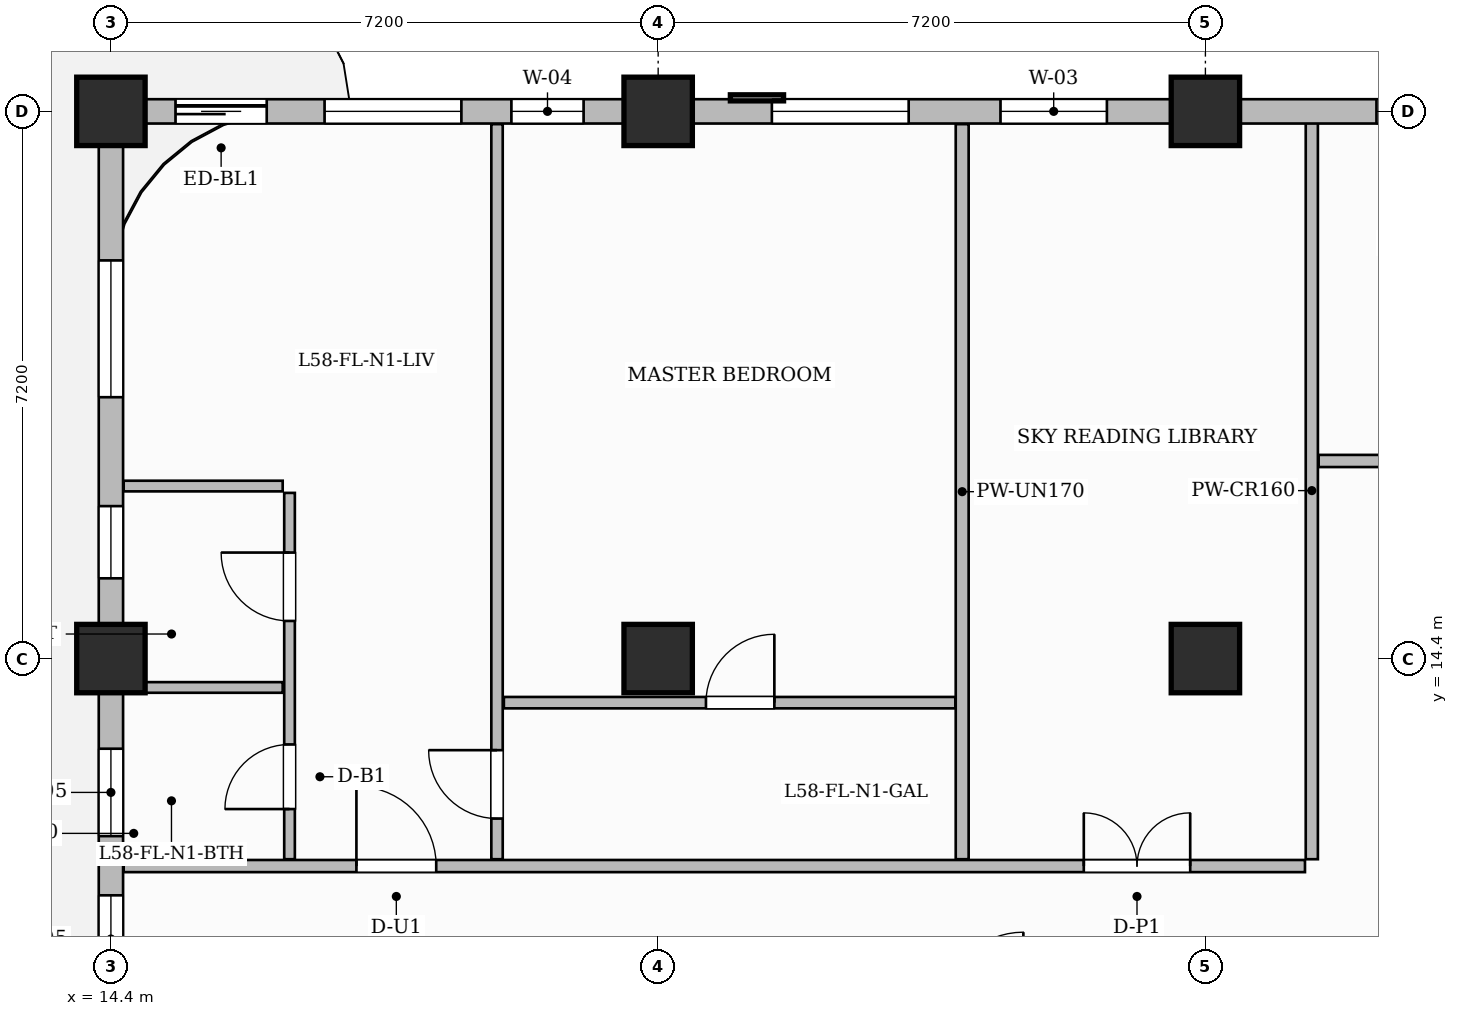
"""IFC4 building model, lengths in metres.
Left out: names, types, materials, properties, quantities, classifications, styles, units other than length and angle.
Written with IfcOpenShell. Run it as: python <this file> out.ifc"""

import sys

from ifc_helpers import new_model, si_unit, direction, frame, frame_2d, origin, origin_2d, place, context, subcontext, project, spatial, rectangle, extrude, source, transform, mapped, element, fill, save


model = new_model("IFC4")
c1 = context("Model", 3, precision=1e-05, world=origin(), true_north=direction((0.0, 1.0)))
c2 = subcontext(c1, "Body", "Model", "MODEL_VIEW")
j1 = project(units=[si_unit("LENGTHUNIT", "METRE"), si_unit("PLANEANGLEUNIT", "RADIAN")], contexts=[c1])
p1 = place(None, origin())
s1 = spatial("IfcSite", under=j1, at=p1, CompositionType="ELEMENT")
p2 = place(p1, origin())
s2 = spatial("IfcBuilding", under=s1, at=p2, CompositionType="ELEMENT")
p3 = place(p2, frame((0.0, 0.0, 232.7)))
s3 = spatial("IfcBuildingStorey", under=s2, at=p3, CompositionType="ELEMENT", Elevation=232.7)
m1 = source(origin(), c2, "Body", "SweptSolid", [
    extrude(rectangle(XDim=0.9, YDim=0.9, at=origin_2d()), origin(), (0.0, 0.0, 1.0), 3.85),
])
for number, where, z_axis, x_axis in (
    (1, (14.4, 14.4, 0.0), (0.0, 0.0, 1.0), (1.0, 0.0, 0.0)),
    (2, (14.4, 21.6, 0.0), (0.0, 0.0, 1.0), (1.0, 0.0, 0.0)),
    (3, (21.6, 14.4, 0.0), (0.0, 0.0, 1.0), (1.0, 0.0, 0.0)),
    (4, (21.6, 21.6, 0.0), (0.0, 0.0, 1.0), (1.0, 0.0, 0.0)),
    (5, (28.8, 14.4, 0.0), (0.0, 0.0, 1.0), (1.0, 0.0, 0.0)),
    (6, (28.8, 21.6, 0.0), (0.0, 0.0, 1.0), (1.0, 0.0, 0.0)),
):
    element("IfcColumn", number, at=place(p3, frame(where, z_axis=z_axis, x_axis=x_axis)), inside=s3, PredefinedType="COLUMN", context=c2, shape_type="MappedRepresentation", body=[
        mapped(m1, transform((0.0, 0.0, 0.0), scale=1.0)),
    ])
p4 = place(p3, frame((14.568, 11.67, 0.0), z_axis=(0.0, 0.0, 1.0), x_axis=(1.0, 0.0, 0.0)))
e7 = element("IfcWall", 7, at=p4, inside=s3, PredefinedType="PARTITIONING", context=c2, shape_type="SweptSolid", body=[
    extrude(rectangle(XDim=15.542, YDim=0.16, at=frame_2d((7.771, 0.0))), origin(), (0.0, 0.0, 1.0), 3.6),
])
p5 = place(p4, frame((3.062, 0.0, 0.0)))
e8 = element("IfcOpeningElement", 8, at=p5, cuts=e7, PredefinedType="OPENING", context=c2, shape_type="SweptSolid", body=[
    extrude(rectangle(XDim=1.05, YDim=2.25, at=frame_2d((0.525, 1.125))), frame((0.0, 0.09, 0.0), z_axis=(0.0, -1.0, 0.0), x_axis=(1.0, 0.0, 0.0)), (0.0, 0.0, 1.0), 0.18),
])
p6 = place(p4, frame((12.632, 0.0, 0.0)))
e9 = element("IfcOpeningElement", 9, at=p6, cuts=e7, PredefinedType="OPENING", context=c2, shape_type="SweptSolid", body=[
    extrude(rectangle(XDim=1.4, YDim=2.35, at=frame_2d((0.7, 1.175))), frame((0.0, 0.09, 0.0), z_axis=(0.0, -1.0, 0.0), x_axis=(1.0, 0.0, 0.0)), (0.0, 0.0, 1.0), 0.18),
])
p7 = place(p3, frame((30.2, 11.76, 0.0), z_axis=(0.0, 0.0, 1.0), x_axis=(0.0, 1.0, 0.0)))
e10 = element("IfcWall", 10, at=p7, inside=s3, PredefinedType="PARTITIONING", context=c2, shape_type="SweptSolid", body=[
    extrude(rectangle(XDim=9.7, YDim=0.16, at=frame_2d((4.85, 0.0))), origin(), (0.0, 0.0, 1.0), 3.6),
])
p8 = place(p3, frame((30.29, 17.0, 0.0), z_axis=(0.0, 0.0, 1.0), x_axis=(1.0, 0.0, 0.0)))
e11 = element("IfcWall", 11, at=p8, inside=s3, PredefinedType="PARTITIONING", context=c2, shape_type="SweptSolid", body=[
    extrude(rectangle(XDim=19.37, YDim=0.16, at=frame_2d((9.685, 0.0))), origin(), (0.0, 0.0, 1.0), 3.6),
])
p9 = place(p8, frame((1.235, 0.0, 0.0)))
e12 = element("IfcOpeningElement", 12, at=p9, cuts=e11, PredefinedType="OPENING", context=c2, shape_type="SweptSolid", body=[
    extrude(rectangle(XDim=0.85, YDim=2.1, at=frame_2d((0.425, 1.05))), frame((0.0, 0.09, 0.0), z_axis=(0.0, -1.0, 0.0), x_axis=(1.0, 0.0, 0.0)), (0.0, 0.0, 1.0), 0.18),
])
p10 = place(p8, frame((7.56, 0.0, 0.0)))
e13 = element("IfcOpeningElement", 13, at=p10, cuts=e11, PredefinedType="OPENING", context=c2, shape_type="SweptSolid", body=[
    extrude(rectangle(XDim=1.4, YDim=2.35, at=frame_2d((0.7, 1.175))), frame((0.0, 0.09, 0.0), z_axis=(0.0, -1.0, 0.0), x_axis=(1.0, 0.0, 0.0)), (0.0, 0.0, 1.0), 0.18),
])
p11 = place(p8, frame((15.785, 0.0, 0.0)))
e14 = element("IfcOpeningElement", 14, at=p11, cuts=e11, PredefinedType="OPENING", context=c2, shape_type="SweptSolid", body=[
    extrude(rectangle(XDim=0.95, YDim=2.15, at=frame_2d((0.475, 1.075))), frame((0.0, 0.09, 0.0), z_axis=(0.0, -1.0, 0.0), x_axis=(1.0, 0.0, 0.0)), (0.0, 0.0, 1.0), 0.18),
])
p12 = place(p3, frame((25.6, 11.76, 0.0), z_axis=(0.0, 0.0, 1.0), x_axis=(0.0, 1.0, 0.0)))
e15 = element("IfcWall", 15, at=p12, inside=s3, PredefinedType="PARTITIONING", context=c2, shape_type="SweptSolid", body=[
    extrude(rectangle(XDim=9.672, YDim=0.17, at=frame_2d((4.836, 0.0))), origin(), (0.0, 0.0, 1.0), 3.6),
])
p13 = place(p3, frame((16.75, 11.76, 0.0), z_axis=(0.0, 0.0, 1.0), x_axis=(0.0, 1.0, 0.0)))
e16 = element("IfcWall", 16, at=p13, inside=s3, PredefinedType="PARTITIONING", context=c2, shape_type="SweptSolid", body=[
    extrude(rectangle(XDim=4.82, YDim=0.14, at=frame_2d((2.41, 0.0))), origin(), (0.0, 0.0, 1.0), 3.6),
])
p14 = place(p13, frame((0.66, 0.0, 0.0)))
e17 = element("IfcOpeningElement", 17, at=p14, cuts=e16, PredefinedType="OPENING", context=c2, shape_type="SweptSolid", body=[
    extrude(rectangle(XDim=0.85, YDim=2.1, at=frame_2d((0.425, 1.05))), frame((0.0, 0.08, 0.0), z_axis=(0.0, -1.0, 0.0), x_axis=(1.0, 0.0, 0.0)), (0.0, 0.0, 1.0), 0.16),
])
p15 = place(p13, frame((3.135, 0.0, 0.0)))
e18 = element("IfcOpeningElement", 18, at=p15, cuts=e16, PredefinedType="OPENING", context=c2, shape_type="SweptSolid", body=[
    extrude(rectangle(XDim=0.9, YDim=2.15, at=frame_2d((0.45, 1.075))), frame((0.0, 0.08, 0.0), z_axis=(0.0, -1.0, 0.0), x_axis=(1.0, 0.0, 0.0)), (0.0, 0.0, 1.0), 0.16),
])
p16 = place(p3, frame((14.59, 14.02, 0.0), z_axis=(0.0, 0.0, 1.0), x_axis=(1.0, 0.0, 0.0)))
e19 = element("IfcWall", 19, at=p16, inside=s3, PredefinedType="PARTITIONING", context=c2, shape_type="SweptSolid", body=[
    extrude(rectangle(XDim=2.07, YDim=0.14, at=frame_2d((1.035, 0.0))), origin(), (0.0, 0.0, 1.0), 3.6),
])
p17 = place(p3, frame((14.568, 16.67, 0.0), z_axis=(0.0, 0.0, 1.0), x_axis=(1.0, 0.0, 0.0)))
e20 = element("IfcWall", 20, at=p17, inside=s3, PredefinedType="PARTITIONING", context=c2, shape_type="SweptSolid", body=[
    extrude(rectangle(XDim=2.092, YDim=0.14, at=frame_2d((1.046, 0.0))), origin(), (0.0, 0.0, 1.0), 3.6),
])
p18 = place(p3, frame((19.48, 11.76, 0.0), z_axis=(0.0, 0.0, 1.0), x_axis=(0.0, 1.0, 0.0)))
e21 = element("IfcWall", 21, at=p18, inside=s3, PredefinedType="PARTITIONING", context=c2, shape_type="SweptSolid", body=[
    extrude(rectangle(XDim=9.672, YDim=0.15, at=frame_2d((4.836, 0.0))), origin(), (0.0, 0.0, 1.0), 3.6),
])
p19 = place(p18, frame((0.535, 0.0, 0.0)))
e22 = element("IfcOpeningElement", 22, at=p19, cuts=e21, PredefinedType="OPENING", context=c2, shape_type="SweptSolid", body=[
    extrude(rectangle(XDim=0.9, YDim=2.15, at=frame_2d((0.45, 1.075))), frame((0.0, 0.085, 0.0), z_axis=(0.0, -1.0, 0.0), x_axis=(1.0, 0.0, 0.0)), (0.0, 0.0, 1.0), 0.17),
])
p20 = place(p3, frame((19.57, 13.82, 0.0), z_axis=(0.0, 0.0, 1.0), x_axis=(1.0, 0.0, 0.0)))
e23 = element("IfcWall", 23, at=p20, inside=s3, PredefinedType="PARTITIONING", context=c2, shape_type="SweptSolid", body=[
    extrude(rectangle(XDim=5.94, YDim=0.15, at=frame_2d((2.97, 0.0))), origin(), (0.0, 0.0, 1.0), 3.6),
])
p21 = place(p20, frame((2.659, 0.0, 0.0)))
e24 = element("IfcOpeningElement", 24, at=p21, cuts=e23, PredefinedType="OPENING", context=c2, shape_type="SweptSolid", body=[
    extrude(rectangle(XDim=0.9, YDim=2.15, at=frame_2d((0.45, 1.075))), frame((0.0, 0.085, 0.0), z_axis=(0.0, -1.0, 0.0), x_axis=(1.0, 0.0, 0.0)), (0.0, 0.0, 1.0), 0.17),
])
p22 = place(p3, frame((14.4, 21.6, 0.0), z_axis=(0.0, 0.0, 1.0), x_axis=(1.0, 0.0, 0.0)))
e25 = element("IfcWall", 25, at=p22, inside=s3, PredefinedType="SOLIDWALL", context=c2, shape_type="SweptSolid", body=[
    extrude(rectangle(XDim=35.4, YDim=0.32, at=frame_2d((17.7, 0.0))), origin(), (0.0, 0.0, 1.0), 3.135),
])
p23 = place(p22, frame((0.85, 0.0, 0.0)))
e26 = element("IfcOpeningElement", 26, at=p23, cuts=e25, PredefinedType="OPENING", context=c2, shape_type="SweptSolid", body=[
    extrude(rectangle(XDim=1.2, YDim=2.2, at=frame_2d((0.6, 1.1))), frame((0.0, 0.17, 0.0), z_axis=(0.0, -1.0, 0.0), x_axis=(1.0, 0.0, 0.0)), (0.0, 0.0, 1.0), 0.34),
])
p24 = place(p22, frame((2.811, 0.0, 0.8)))
e27 = element("IfcOpeningElement", 27, at=p24, cuts=e25, PredefinedType="OPENING", context=c2, shape_type="SweptSolid", body=[
    extrude(rectangle(XDim=1.8, YDim=1.85, at=frame_2d((0.9, 0.925))), frame((0.0, 0.17, 0.0), z_axis=(0.0, -1.0, 0.0), x_axis=(1.0, 0.0, 0.0)), (0.0, 0.0, 1.0), 0.34),
])
p25 = place(p22, frame((5.269, 0.0, 0.8)))
e28 = element("IfcOpeningElement", 28, at=p25, cuts=e25, PredefinedType="OPENING", context=c2, shape_type="SweptSolid", body=[
    extrude(rectangle(XDim=0.95, YDim=1.75, at=frame_2d((0.475, 0.875))), frame((0.0, 0.17, 0.0), z_axis=(0.0, -1.0, 0.0), x_axis=(1.0, 0.0, 0.0)), (0.0, 0.0, 1.0), 0.34),
])
p26 = place(p22, frame((8.696, 0.0, 0.8)))
e29 = element("IfcOpeningElement", 29, at=p26, cuts=e25, PredefinedType="OPENING", context=c2, shape_type="SweptSolid", body=[
    extrude(rectangle(XDim=1.8, YDim=1.85, at=frame_2d((0.9, 0.925))), frame((0.0, 0.17, 0.0), z_axis=(0.0, -1.0, 0.0), x_axis=(1.0, 0.0, 0.0)), (0.0, 0.0, 1.0), 0.34),
])
p27 = place(p22, frame((11.704, 0.0, 0.8)))
e30 = element("IfcOpeningElement", 30, at=p27, cuts=e25, PredefinedType="OPENING", context=c2, shape_type="SweptSolid", body=[
    extrude(rectangle(XDim=1.4, YDim=1.85, at=frame_2d((0.7, 0.925))), frame((0.0, 0.17, 0.0), z_axis=(0.0, -1.0, 0.0), x_axis=(1.0, 0.0, 0.0)), (0.0, 0.0, 1.0), 0.34),
])
p28 = place(p22, frame((16.651, 0.0, 0.8)))
e31 = element("IfcOpeningElement", 31, at=p28, cuts=e25, PredefinedType="OPENING", context=c2, shape_type="SweptSolid", body=[
    extrude(rectangle(XDim=1.8, YDim=1.85, at=frame_2d((0.9, 0.925))), frame((0.0, 0.17, 0.0), z_axis=(0.0, -1.0, 0.0), x_axis=(1.0, 0.0, 0.0)), (0.0, 0.0, 1.0), 0.34),
])
p29 = place(p22, frame((21.725, 0.0, 0.8)))
e32 = element("IfcOpeningElement", 32, at=p29, cuts=e25, PredefinedType="OPENING", context=c2, shape_type="SweptSolid", body=[
    extrude(rectangle(XDim=1.8, YDim=1.85, at=frame_2d((0.9, 0.925))), frame((0.0, 0.17, 0.0), z_axis=(0.0, -1.0, 0.0), x_axis=(1.0, 0.0, 0.0)), (0.0, 0.0, 1.0), 0.34),
])
p30 = place(p22, frame((24.475, 0.0, 0.8)))
e33 = element("IfcOpeningElement", 33, at=p30, cuts=e25, PredefinedType="OPENING", context=c2, shape_type="SweptSolid", body=[
    extrude(rectangle(XDim=1.8, YDim=1.85, at=frame_2d((0.9, 0.925))), frame((0.0, 0.17, 0.0), z_axis=(0.0, -1.0, 0.0), x_axis=(1.0, 0.0, 0.0)), (0.0, 0.0, 1.0), 0.34),
])
p31 = place(p22, frame((29.531, 0.0, 0.8)))
e34 = element("IfcOpeningElement", 34, at=p31, cuts=e25, PredefinedType="OPENING", context=c2, shape_type="SweptSolid", body=[
    extrude(rectangle(XDim=1.8, YDim=1.85, at=frame_2d((0.9, 0.925))), frame((0.0, 0.17, 0.0), z_axis=(0.0, -1.0, 0.0), x_axis=(1.0, 0.0, 0.0)), (0.0, 0.0, 1.0), 0.34),
])
p32 = place(p22, frame((32.277, 0.0, 0.8)))
e35 = element("IfcOpeningElement", 35, at=p32, cuts=e25, PredefinedType="OPENING", context=c2, shape_type="SweptSolid", body=[
    extrude(rectangle(XDim=1.8, YDim=1.85, at=frame_2d((0.9, 0.925))), frame((0.0, 0.17, 0.0), z_axis=(0.0, -1.0, 0.0), x_axis=(1.0, 0.0, 0.0)), (0.0, 0.0, 1.0), 0.34),
])
p33 = place(p3, frame((14.4, 0.05, 0.0), z_axis=(0.0, 0.0, 1.0), x_axis=(0.0, 1.0, 0.0)))
e36 = element("IfcWall", 36, at=p33, inside=s3, PredefinedType="SOLIDWALL", context=c2, shape_type="SweptSolid", body=[
    extrude(rectangle(XDim=21.5, YDim=0.32, at=frame_2d((10.75, 0.0))), origin(), (0.0, 0.0, 1.0), 3.135),
])
p34 = place(p33, frame((1.275, 0.0, 0.8)))
e37 = element("IfcOpeningElement", 37, at=p34, cuts=e36, PredefinedType="OPENING", context=c2, shape_type="SweptSolid", body=[
    extrude(rectangle(XDim=1.8, YDim=1.85, at=frame_2d((0.9, 0.925))), frame((0.0, 0.17, 0.0), z_axis=(0.0, -1.0, 0.0), x_axis=(1.0, 0.0, 0.0)), (0.0, 0.0, 1.0), 0.34),
])
p35 = place(p33, frame((4.025, 0.0, 0.8)))
e38 = element("IfcOpeningElement", 38, at=p35, cuts=e36, PredefinedType="OPENING", context=c2, shape_type="SweptSolid", body=[
    extrude(rectangle(XDim=1.8, YDim=1.85, at=frame_2d((0.9, 0.925))), frame((0.0, 0.17, 0.0), z_axis=(0.0, -1.0, 0.0), x_axis=(1.0, 0.0, 0.0)), (0.0, 0.0, 1.0), 0.34),
])
p36 = place(p33, frame((8.246, 0.0, 0.8)))
e39 = element("IfcOpeningElement", 39, at=p36, cuts=e36, PredefinedType="OPENING", context=c2, shape_type="SweptSolid", body=[
    extrude(rectangle(XDim=1.15, YDim=1.8, at=frame_2d((0.575, 0.9))), frame((0.0, 0.17, 0.0), z_axis=(0.0, -1.0, 0.0), x_axis=(1.0, 0.0, 0.0)), (0.0, 0.0, 1.0), 0.34),
])
p37 = place(p33, frame((10.085, 0.0, 0.8)))
e40 = element("IfcOpeningElement", 40, at=p37, cuts=e36, PredefinedType="OPENING", context=c2, shape_type="SweptSolid", body=[
    extrude(rectangle(XDim=1.15, YDim=1.8, at=frame_2d((0.575, 0.9))), frame((0.0, 0.17, 0.0), z_axis=(0.0, -1.0, 0.0), x_axis=(1.0, 0.0, 0.0)), (0.0, 0.0, 1.0), 0.34),
])
p38 = place(p33, frame((12.014, 0.0, 0.8)))
e41 = element("IfcOpeningElement", 41, at=p38, cuts=e36, PredefinedType="OPENING", context=c2, shape_type="SweptSolid", body=[
    extrude(rectangle(XDim=1.15, YDim=1.8, at=frame_2d((0.575, 0.9))), frame((0.0, 0.17, 0.0), z_axis=(0.0, -1.0, 0.0), x_axis=(1.0, 0.0, 0.0)), (0.0, 0.0, 1.0), 0.34),
])
p39 = place(p33, frame((15.406, 0.0, 0.8)))
e42 = element("IfcOpeningElement", 42, at=p39, cuts=e36, PredefinedType="OPENING", context=c2, shape_type="SweptSolid", body=[
    extrude(rectangle(XDim=0.95, YDim=1.75, at=frame_2d((0.475, 0.875))), frame((0.0, 0.17, 0.0), z_axis=(0.0, -1.0, 0.0), x_axis=(1.0, 0.0, 0.0)), (0.0, 0.0, 1.0), 0.34),
])
p40 = place(p33, frame((17.789, 0.0, 0.8)))
e43 = element("IfcOpeningElement", 43, at=p40, cuts=e36, PredefinedType="OPENING", context=c2, shape_type="SweptSolid", body=[
    extrude(rectangle(XDim=1.8, YDim=1.85, at=frame_2d((0.9, 0.925))), frame((0.0, 0.17, 0.0), z_axis=(0.0, -1.0, 0.0), x_axis=(1.0, 0.0, 0.0)), (0.0, 0.0, 1.0), 0.34),
])
m2 = source(origin(), c2, "Body", "SweptSolid", [
    extrude(rectangle(XDim=0.85, YDim=2.1, at=frame_2d((0.425, 1.05))), frame((0.0, 0.025, 0.0), z_axis=(0.0, -1.0, 0.0), x_axis=(1.0, 0.0, 0.0)), (0.0, 0.0, 1.0), 0.05),
])
p41 = place(p14, origin())
e44 = element("IfcDoor", 44, at=p41, inside=s3, OperationType="SINGLE_SWING_LEFT", PredefinedType="DOOR", context=c2, shape_type="MappedRepresentation", body=[
    mapped(m2, transform((0.0, 0.0, 0.0), scale=1.0)),
])
fill(e17, e44)
m3 = source(origin(), c2, "Body", "SweptSolid", [
    extrude(rectangle(XDim=0.9, YDim=2.15, at=frame_2d((0.45, 1.075))), frame((0.0, 0.025, 0.0), z_axis=(0.0, -1.0, 0.0), x_axis=(1.0, 0.0, 0.0)), (0.0, 0.0, 1.0), 0.05),
])
p42 = place(p15, origin())
e45 = element("IfcDoor", 45, at=p42, inside=s3, OperationType="SINGLE_SWING_RIGHT", PredefinedType="DOOR", context=c2, shape_type="MappedRepresentation", body=[
    mapped(m3, transform((0.0, 0.0, 0.0), scale=1.0)),
])
fill(e18, e45)
m4 = source(origin(), c2, "Body", "SweptSolid", [
    extrude(rectangle(XDim=1.05, YDim=2.25, at=frame_2d((0.525, 1.125))), frame((0.0, 0.025, 0.0), z_axis=(0.0, -1.0, 0.0), x_axis=(1.0, 0.0, 0.0)), (0.0, 0.0, 1.0), 0.05),
])
p43 = place(p5, origin())
e46 = element("IfcDoor", 46, at=p43, inside=s3, OperationType="SINGLE_SWING_LEFT", PredefinedType="DOOR", context=c2, shape_type="MappedRepresentation", body=[
    mapped(m4, transform((0.0, 0.0, 0.0), scale=1.0)),
])
fill(e8, e46)
p44 = place(p19, origin())
e47 = element("IfcDoor", 47, at=p44, inside=s3, OperationType="SINGLE_SWING_RIGHT", PredefinedType="DOOR", context=c2, shape_type="MappedRepresentation", body=[
    mapped(m3, transform((0.0, 0.0, 0.0), scale=1.0)),
])
fill(e22, e47)
p45 = place(p21, origin())
e48 = element("IfcDoor", 48, at=p45, inside=s3, OperationType="SINGLE_SWING_RIGHT", PredefinedType="DOOR", context=c2, shape_type="MappedRepresentation", body=[
    mapped(m3, transform((0.0, 0.0, 0.0), scale=1.0)),
])
fill(e24, e48)
m5 = source(origin(), c2, "Body", "SweptSolid", [
    extrude(rectangle(XDim=1.4, YDim=2.35, at=frame_2d((0.7, 1.175))), frame((0.0, 0.025, 0.0), z_axis=(0.0, -1.0, 0.0), x_axis=(1.0, 0.0, 0.0)), (0.0, 0.0, 1.0), 0.05),
])
p46 = place(p6, origin())
e49 = element("IfcDoor", 49, at=p46, inside=s3, OperationType="DOUBLE_DOOR_SINGLE_SWING", PredefinedType="DOOR", context=c2, shape_type="MappedRepresentation", body=[
    mapped(m5, transform((0.0, 0.0, 0.0), scale=1.0)),
])
fill(e9, e49)
m6 = source(origin(), c2, "Body", "SweptSolid", [
    extrude(rectangle(XDim=1.2, YDim=2.2, at=frame_2d((0.6, 1.1))), frame((0.0, 0.025, 0.0), z_axis=(0.0, -1.0, 0.0), x_axis=(1.0, 0.0, 0.0)), (0.0, 0.0, 1.0), 0.05),
])
p47 = place(p23, origin())
e50 = element("IfcDoor", 50, at=p47, inside=s3, OperationType="SLIDING_TO_LEFT", PredefinedType="DOOR", context=c2, shape_type="MappedRepresentation", body=[
    mapped(m6, transform((0.0, 0.0, 0.0), scale=1.0)),
])
fill(e26, e50)
m7 = source(origin(), c2, "Body", "SweptSolid", [
    extrude(rectangle(XDim=1.8, YDim=1.85, at=frame_2d((0.9, 0.925))), frame((0.0, 0.03, 0.0), z_axis=(0.0, -1.0, 0.0), x_axis=(1.0, 0.0, 0.0)), (0.0, 0.0, 1.0), 0.06),
])
p48 = place(p24, origin())
e51 = element("IfcWindow", 51, at=p48, inside=s3, PartitioningType="DOUBLE_PANEL_VERTICAL", PredefinedType="WINDOW", context=c2, shape_type="MappedRepresentation", body=[
    mapped(m7, transform((0.0, 0.0, 0.0), scale=1.0)),
])
fill(e27, e51)
m8 = source(origin(), c2, "Body", "SweptSolid", [
    extrude(rectangle(XDim=0.95, YDim=1.75, at=frame_2d((0.475, 0.875))), frame((0.0, 0.03, 0.0), z_axis=(0.0, -1.0, 0.0), x_axis=(1.0, 0.0, 0.0)), (0.0, 0.0, 1.0), 0.06),
])
p49 = place(p25, origin())
e52 = element("IfcWindow", 52, at=p49, inside=s3, PartitioningType="SINGLE_PANEL", PredefinedType="WINDOW", context=c2, shape_type="MappedRepresentation", body=[
    mapped(m8, transform((0.0, 0.0, 0.0), scale=1.0)),
])
fill(e28, e52)
p50 = place(p26, origin())
e53 = element("IfcWindow", 53, at=p50, inside=s3, PartitioningType="DOUBLE_PANEL_VERTICAL", PredefinedType="WINDOW", context=c2, shape_type="MappedRepresentation", body=[
    mapped(m7, transform((0.0, 0.0, 0.0), scale=1.0)),
])
fill(e29, e53)
m9 = source(origin(), c2, "Body", "SweptSolid", [
    extrude(rectangle(XDim=1.4, YDim=1.85, at=frame_2d((0.7, 0.925))), frame((0.0, 0.03, 0.0), z_axis=(0.0, -1.0, 0.0), x_axis=(1.0, 0.0, 0.0)), (0.0, 0.0, 1.0), 0.06),
])
p51 = place(p27, origin())
e54 = element("IfcWindow", 54, at=p51, inside=s3, PartitioningType="SINGLE_PANEL", PredefinedType="WINDOW", context=c2, shape_type="MappedRepresentation", body=[
    mapped(m9, transform((0.0, 0.0, 0.0), scale=1.0)),
])
fill(e30, e54)
p52 = place(p28, origin())
e55 = element("IfcWindow", 55, at=p52, inside=s3, PartitioningType="DOUBLE_PANEL_VERTICAL", PredefinedType="WINDOW", context=c2, shape_type="MappedRepresentation", body=[
    mapped(m7, transform((0.0, 0.0, 0.0), scale=1.0)),
])
fill(e31, e55)
m10 = source(origin(), c2, "Body", "SweptSolid", [
    extrude(rectangle(XDim=1.15, YDim=1.8, at=frame_2d((0.575, 0.9))), frame((0.0, 0.03, 0.0), z_axis=(0.0, -1.0, 0.0), x_axis=(1.0, 0.0, 0.0)), (0.0, 0.0, 1.0), 0.06),
])
p53 = place(p37, origin())
e56 = element("IfcWindow", 56, at=p53, inside=s3, PartitioningType="SINGLE_PANEL", PredefinedType="WINDOW", context=c2, shape_type="MappedRepresentation", body=[
    mapped(m10, transform((0.0, 0.0, 0.0), scale=1.0)),
])
fill(e40, e56)
p54 = place(p38, origin())
e57 = element("IfcWindow", 57, at=p54, inside=s3, PartitioningType="SINGLE_PANEL", PredefinedType="WINDOW", context=c2, shape_type="MappedRepresentation", body=[
    mapped(m10, transform((0.0, 0.0, 0.0), scale=1.0)),
])
fill(e41, e57)
p55 = place(p39, origin())
e58 = element("IfcWindow", 58, at=p55, inside=s3, PartitioningType="SINGLE_PANEL", PredefinedType="WINDOW", context=c2, shape_type="MappedRepresentation", body=[
    mapped(m8, transform((0.0, 0.0, 0.0), scale=1.0)),
])
fill(e42, e58)
p56 = place(p40, origin())
e59 = element("IfcWindow", 59, at=p56, inside=s3, PartitioningType="DOUBLE_PANEL_VERTICAL", PredefinedType="WINDOW", context=c2, shape_type="MappedRepresentation", body=[
    mapped(m7, transform((0.0, 0.0, 0.0), scale=1.0)),
])
fill(e43, e59)
save(model, sys.argv[1])
